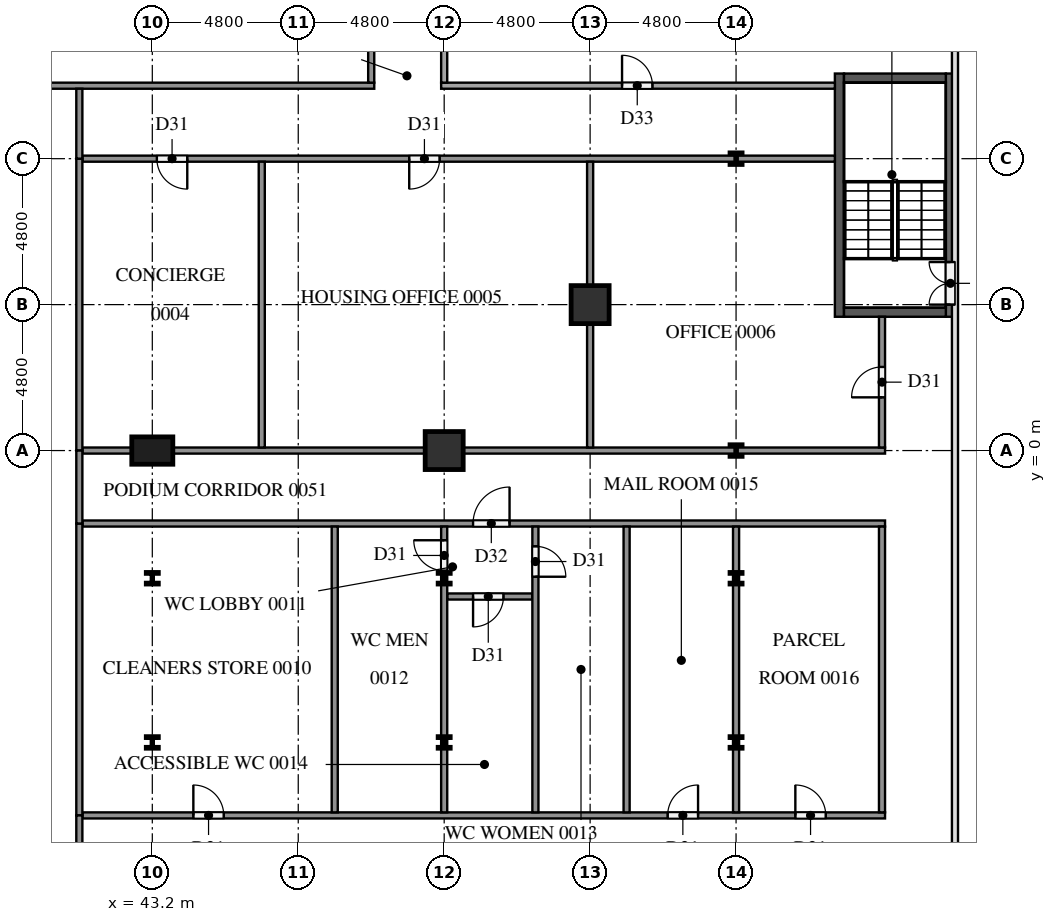
"""IFC4 building model, lengths in metres.
Left out: names, types, materials, properties, quantities, classifications, styles, units other than length and angle.
Written with IfcOpenShell. Run it as: python <this file> out.ifc"""

import sys

from ifc_helpers import new_model, si_unit, direction, frame, frame_2d, origin, origin_2d, place, context, subcontext, project, spatial, rectangle, i_section, extrude, element, fill, save


model = new_model("IFC4")
c1 = context("Model", 3, precision=1e-05, world=origin(), true_north=direction((0.0, 1.0)))
c2 = subcontext(c1, "Body", "Model", "MODEL_VIEW")
j1 = project(units=[si_unit("LENGTHUNIT", "METRE"), si_unit("PLANEANGLEUNIT", "RADIAN")], contexts=[c1])
p1 = place(None, origin())
s1 = spatial("IfcSite", under=j1, at=p1, CompositionType="ELEMENT")
p2 = place(p1, origin())
s2 = spatial("IfcBuilding", under=s1, at=p2, CompositionType="ELEMENT")
p3 = place(p2, origin())
s3 = spatial("IfcBuildingStorey", under=s2, at=p3, CompositionType="ELEMENT", Elevation=0.0)
p4 = place(p3, frame((65.8, 4.4, 0.0), z_axis=(0.0, 0.0, 1.0), x_axis=(0.0, 1.0, 0.0)))
e1 = element("IfcWall", 1, at=p4, inside=s3, PredefinedType="SOLIDWALL", context=c2, shape_type="SweptSolid", body=[
    extrude(rectangle(XDim=8.0, YDim=0.3, at=frame_2d((4.0, 0.0))), origin(), (0.0, 0.0, 1.0), 5.7),
])
p5 = place(p3, frame((69.45, 4.4, 0.0), z_axis=(0.0, 0.0, 1.0), x_axis=(0.0, 1.0, 0.0)))
e2 = element("IfcWall", 2, at=p5, inside=s3, PredefinedType="SOLIDWALL", context=c2, shape_type="SweptSolid", body=[
    extrude(rectangle(XDim=8.0, YDim=0.3, at=frame_2d((4.0, 0.0))), origin(), (0.0, 0.0, 1.0), 5.7),
])
p6 = place(p5, frame((0.4, 0.0, 0.0)))
e3 = element("IfcOpeningElement", 3, at=p6, cuts=e2, PredefinedType="OPENING", context=c2, shape_type="SweptSolid", body=[
    extrude(rectangle(XDim=1.4, YDim=2.1, at=frame_2d((0.7, 1.05))), frame((0.0, 0.16, 0.0), z_axis=(0.0, -1.0, 0.0), x_axis=(1.0, 0.0, 0.0)), (0.0, 0.0, 1.0), 0.32),
])
for number, where, z_axis, x_axis in (
    (4, (65.95, 4.55, 0.0), (0.0, 0.0, 1.0), (1.0, 0.0, 0.0)),
    (5, (65.95, 12.25, 0.0), (0.0, 0.0, 1.0), (1.0, 0.0, 0.0)),
):
    element("IfcWall", number, at=place(p3, frame(where, z_axis=z_axis, x_axis=x_axis)), inside=s3, PredefinedType="SOLIDWALL", context=c2, shape_type="SweptSolid", body=[
        extrude(rectangle(XDim=3.35, YDim=0.3, at=frame_2d((1.675, 0.0))), origin(), (0.0, 0.0, 1.0), 5.7),
    ])
p7 = place(p3, frame((43.2, 0.0, 0.0), z_axis=(0.0, 0.0, 1.0), x_axis=(1.0, 0.0, 0.0)))
e6 = element("IfcColumn", 6, at=p7, inside=s3, PredefinedType="COLUMN", context=c2, shape_type="SweptSolid", body=[
    extrude(rectangle(XDim=1.35, YDim=0.9, at=origin_2d()), origin(), (0.0, 0.0, 1.0), 5.7),
])
for number, where, z_axis, x_axis in (
    (7, (52.8, 0.0, 0.0), (0.0, 0.0, 1.0), (1.0, 0.0, 0.0)),
    (8, (57.6, 4.8, 0.0), (0.0, 0.0, 1.0), (1.0, 0.0, 0.0)),
):
    element("IfcColumn", number, at=place(p3, frame(where, z_axis=z_axis, x_axis=x_axis)), inside=s3, PredefinedType="COLUMN", context=c2, shape_type="SweptSolid", body=[
        extrude(rectangle(XDim=1.25, YDim=1.25, at=origin_2d()), origin(), (0.0, 0.0, 1.0), 5.7),
    ])
for number, where, z_axis, x_axis in (
    (9, (43.2, -9.6, 0.0), (0.0, 0.0, 1.0), (1.0, 0.0, 0.0)),
    (10, (43.2, -4.2, 0.0), (0.0, 0.0, 1.0), (1.0, 0.0, 0.0)),
    (11, (52.8, -9.6, 0.0), (0.0, 0.0, 1.0), (1.0, 0.0, 0.0)),
    (12, (52.8, -4.2, 0.0), (0.0, 0.0, 1.0), (1.0, 0.0, 0.0)),
    (13, (62.4, -9.6, 0.0), (0.0, 0.0, 1.0), (1.0, 0.0, 0.0)),
    (14, (62.4, -4.2, 0.0), (0.0, 0.0, 1.0), (1.0, 0.0, 0.0)),
    (15, (62.4, 0.0, 0.0), (0.0, 0.0, 1.0), (1.0, 0.0, 0.0)),
    (16, (62.4, 9.6, 0.0), (0.0, 0.0, 1.0), (1.0, 0.0, 0.0)),
):
    element("IfcColumn", number, at=place(p3, frame(where, z_axis=z_axis, x_axis=x_axis)), inside=s3, PredefinedType="COLUMN", context=c2, shape_type="SweptSolid", body=[
        extrude(i_section(OverallWidth=0.396, OverallDepth=0.381, WebThickness=0.019, FlangeThickness=0.03, at=origin_2d()), origin(), (0.0, 0.0, 1.0), 5.7),
    ])
p8 = place(p3, frame((40.9, -12.0, 0.0), z_axis=(0.0, 0.0, 1.0), x_axis=(1.0, 0.0, 0.0)))
e17 = element("IfcWall", 17, at=p8, inside=s3, PredefinedType="PARTITIONING", context=c2, shape_type="SweptSolid", body=[
    extrude(rectangle(XDim=26.4, YDim=0.2, at=frame_2d((13.2, 0.0))), origin(), (0.0, 0.0, 1.0), 5.7),
])
p9 = place(p8, frame((3.65, 0.0, 0.0)))
e18 = element("IfcOpeningElement", 18, at=p9, cuts=e17, PredefinedType="OPENING", context=c2, shape_type="SweptSolid", body=[
    extrude(rectangle(XDim=1.0, YDim=2.1, at=frame_2d((0.5, 1.05))), frame((0.0, 0.11, 0.0), z_axis=(0.0, -1.0, 0.0), x_axis=(1.0, 0.0, 0.0)), (0.0, 0.0, 1.0), 0.22),
])
p10 = place(p8, frame((19.25, 0.0, 0.0)))
e19 = element("IfcOpeningElement", 19, at=p10, cuts=e17, PredefinedType="OPENING", context=c2, shape_type="SweptSolid", body=[
    extrude(rectangle(XDim=1.0, YDim=2.1, at=frame_2d((0.5, 1.05))), frame((0.0, 0.11, 0.0), z_axis=(0.0, -1.0, 0.0), x_axis=(1.0, 0.0, 0.0)), (0.0, 0.0, 1.0), 0.22),
])
p11 = place(p8, frame((23.45, 0.0, 0.0)))
e20 = element("IfcOpeningElement", 20, at=p11, cuts=e17, PredefinedType="OPENING", context=c2, shape_type="SweptSolid", body=[
    extrude(rectangle(XDim=1.0, YDim=2.1, at=frame_2d((0.5, 1.05))), frame((0.0, 0.11, 0.0), z_axis=(0.0, -1.0, 0.0), x_axis=(1.0, 0.0, 0.0)), (0.0, 0.0, 1.0), 0.22),
])
p12 = place(p3, frame((55.7, -4.8, 0.0), z_axis=(0.0, 0.0, 1.0), x_axis=(-1.0, 0.0, 0.0)))
e21 = element("IfcWall", 21, at=p12, inside=s3, PredefinedType="PARTITIONING", context=c2, shape_type="SweptSolid", body=[
    extrude(rectangle(XDim=2.8, YDim=0.2, at=frame_2d((1.4, 0.0))), origin(), (0.0, 0.0, 1.0), 5.7),
])
p13 = place(p12, frame((0.95, 0.0, 0.0)))
e22 = element("IfcOpeningElement", 22, at=p13, cuts=e21, PredefinedType="OPENING", context=c2, shape_type="SweptSolid", body=[
    extrude(rectangle(XDim=1.0, YDim=2.1, at=frame_2d((0.5, 1.05))), frame((0.0, 0.11, 0.0), z_axis=(0.0, -1.0, 0.0), x_axis=(1.0, 0.0, 0.0)), (0.0, 0.0, 1.0), 0.22),
])
p14 = place(p3, frame((40.9, -2.4, 0.0), z_axis=(0.0, 0.0, 1.0), x_axis=(1.0, 0.0, 0.0)))
e23 = element("IfcWall", 23, at=p14, inside=s3, PredefinedType="PARTITIONING", context=c2, shape_type="SweptSolid", body=[
    extrude(rectangle(XDim=26.4, YDim=0.2, at=frame_2d((13.2, 0.0))), origin(), (0.0, 0.0, 1.0), 5.7),
])
p15 = place(p14, frame((12.85, 0.0, 0.0)))
e24 = element("IfcOpeningElement", 24, at=p15, cuts=e23, PredefinedType="OPENING", context=c2, shape_type="SweptSolid", body=[
    extrude(rectangle(XDim=1.2, YDim=2.1, at=frame_2d((0.6, 1.05))), frame((0.0, 0.11, 0.0), z_axis=(0.0, -1.0, 0.0), x_axis=(1.0, 0.0, 0.0)), (0.0, 0.0, 1.0), 0.22),
])
p16 = place(p3, frame((40.9, 0.0, 0.0), z_axis=(0.0, 0.0, 1.0), x_axis=(1.0, 0.0, 0.0)))
e25 = element("IfcWall", 25, at=p16, inside=s3, PredefinedType="PARTITIONING", context=c2, shape_type="SweptSolid", body=[
    extrude(rectangle(XDim=26.4, YDim=0.2, at=frame_2d((13.2, 0.0))), origin(), (0.0, 0.0, 1.0), 5.7),
])
p17 = place(p3, frame((65.65, 9.6, 0.0), z_axis=(0.0, 0.0, 1.0), x_axis=(-1.0, 0.0, 0.0)))
e26 = element("IfcWall", 26, at=p17, inside=s3, PredefinedType="PARTITIONING", context=c2, shape_type="SweptSolid", body=[
    extrude(rectangle(XDim=24.75, YDim=0.2, at=frame_2d((12.375, 0.0))), origin(), (0.0, 0.0, 1.0), 5.7),
])
p18 = place(p17, frame((21.3, 0.0, 0.0)))
e27 = element("IfcOpeningElement", 27, at=p18, cuts=e26, PredefinedType="OPENING", context=c2, shape_type="SweptSolid", body=[
    extrude(rectangle(XDim=1.0, YDim=2.1, at=frame_2d((0.5, 1.05))), frame((0.0, 0.11, 0.0), z_axis=(0.0, -1.0, 0.0), x_axis=(1.0, 0.0, 0.0)), (0.0, 0.0, 1.0), 0.22),
])
p19 = place(p17, frame((13.0, 0.0, 0.0)))
e28 = element("IfcOpeningElement", 28, at=p19, cuts=e26, PredefinedType="OPENING", context=c2, shape_type="SweptSolid", body=[
    extrude(rectangle(XDim=1.0, YDim=2.1, at=frame_2d((0.5, 1.05))), frame((0.0, 0.11, 0.0), z_axis=(0.0, -1.0, 0.0), x_axis=(1.0, 0.0, 0.0)), (0.0, 0.0, 1.0), 0.22),
])
p20 = place(p3, frame((11.9, 12.0, 0.0), z_axis=(0.0, 0.0, 1.0), x_axis=(1.0, 0.0, 0.0)))
e29 = element("IfcWall", 29, at=p20, inside=s3, PredefinedType="PARTITIONING", context=c2, shape_type="SweptSolid", body=[
    extrude(rectangle(XDim=38.6, YDim=0.2, at=frame_2d((19.3, 0.0))), origin(), (0.0, 0.0, 1.0), 5.7),
])
p21 = place(p20, frame((1.85, 0.0, 0.0)))
e30 = element("IfcOpeningElement", 30, at=p21, cuts=e29, PredefinedType="OPENING", context=c2, shape_type="SweptSolid", body=[
    extrude(rectangle(XDim=1.8, YDim=2.1, at=frame_2d((0.9, 1.05))), frame((0.0, 0.11, 0.0), z_axis=(0.0, -1.0, 0.0), x_axis=(1.0, 0.0, 0.0)), (0.0, 0.0, 1.0), 0.22),
])
p22 = place(p20, frame((23.25, 0.0, 0.0)))
e31 = element("IfcOpeningElement", 31, at=p22, cuts=e29, PredefinedType="OPENING", context=c2, shape_type="SweptSolid", body=[
    extrude(rectangle(XDim=1.8, YDim=2.1, at=frame_2d((0.9, 1.05))), frame((0.0, 0.11, 0.0), z_axis=(0.0, -1.0, 0.0), x_axis=(1.0, 0.0, 0.0)), (0.0, 0.0, 1.0), 0.22),
])
p23 = place(p20, frame((13.65, 0.0, 0.0)))
e32 = element("IfcOpeningElement", 32, at=p23, cuts=e29, PredefinedType="OPENING", context=c2, shape_type="SweptSolid", body=[
    extrude(rectangle(XDim=1.8, YDim=2.1, at=frame_2d((0.9, 1.05))), frame((0.0, 0.11, 0.0), z_axis=(0.0, -1.0, 0.0), x_axis=(1.0, 0.0, 0.0)), (0.0, 0.0, 1.0), 0.22),
])
p24 = place(p20, frame((4.05, 0.0, 0.0)))
e33 = element("IfcOpeningElement", 33, at=p24, cuts=e29, PredefinedType="OPENING", context=c2, shape_type="SweptSolid", body=[
    extrude(rectangle(XDim=1.8, YDim=2.1, at=frame_2d((0.9, 1.05))), frame((0.0, 0.11, 0.0), z_axis=(0.0, -1.0, 0.0), x_axis=(1.0, 0.0, 0.0)), (0.0, 0.0, 1.0), 0.22),
])
p25 = place(p3, frame((52.7, 12.0, 0.0), z_axis=(0.0, 0.0, 1.0), x_axis=(1.0, 0.0, 0.0)))
e34 = element("IfcWall", 34, at=p25, inside=s3, PredefinedType="PARTITIONING", context=c2, shape_type="SweptSolid", body=[
    extrude(rectangle(XDim=12.95, YDim=0.2, at=frame_2d((6.475, 0.0))), origin(), (0.0, 0.0, 1.0), 5.7),
])
p26 = place(p25, frame((5.95, 0.0, 0.0)))
e35 = element("IfcOpeningElement", 35, at=p26, cuts=e34, PredefinedType="OPENING", context=c2, shape_type="SweptSolid", body=[
    extrude(rectangle(XDim=1.0, YDim=2.1, at=frame_2d((0.5, 1.05))), frame((0.0, 0.11, 0.0), z_axis=(0.0, -1.0, 0.0), x_axis=(1.0, 0.0, 0.0)), (0.0, 0.0, 1.0), 0.22),
])
for number, where, z_axis, x_axis in (
    (36, (40.8, -12.0, 0.0), (0.0, 0.0, 1.0), (0.0, 1.0, 0.0)),
    (37, (40.8, 0.0, 0.0), (0.0, 0.0, 1.0), (0.0, 1.0, 0.0)),
):
    element("IfcWall", number, at=place(p3, frame(where, z_axis=z_axis, x_axis=x_axis)), inside=s3, PredefinedType="PARTITIONING", context=c2, shape_type="SweptSolid", body=[
        extrude(rectangle(XDim=9.6, YDim=0.2, at=frame_2d((4.8, 0.0))), origin(), (0.0, 0.0, 1.0), 5.7),
    ])
for number, where, z_axis, x_axis in (
    (38, (40.8, -14.4, 0.0), (0.0, 0.0, 1.0), (0.0, 1.0, 0.0)),
    (39, (40.8, -2.4, 0.0), (0.0, 0.0, 1.0), (0.0, 1.0, 0.0)),
):
    element("IfcWall", number, at=place(p3, frame(where, z_axis=z_axis, x_axis=x_axis)), inside=s3, PredefinedType="PARTITIONING", context=c2, shape_type="SweptSolid", body=[
        extrude(rectangle(XDim=2.4, YDim=0.2, at=frame_2d((1.2, 0.0))), origin(), (0.0, 0.0, 1.0), 5.7),
    ])
p27 = place(p3, frame((40.8, 9.6, 0.0), z_axis=(0.0, 0.0, 1.0), x_axis=(0.0, 1.0, 0.0)))
e40 = element("IfcWall", 40, at=p27, inside=s3, PredefinedType="PARTITIONING", context=c2, shape_type="SweptSolid", body=[
    extrude(rectangle(XDim=2.3, YDim=0.2, at=frame_2d((1.15, 0.0))), origin(), (0.0, 0.0, 1.0), 5.7),
])
for number, where, z_axis, x_axis in (
    (41, (46.8, 0.1, 0.0), (0.0, 0.0, 1.0), (0.0, 1.0, 0.0)),
    (42, (49.2, -11.9, 0.0), (0.0, 0.0, 1.0), (0.0, 1.0, 0.0)),
):
    element("IfcWall", number, at=place(p3, frame(where, z_axis=z_axis, x_axis=x_axis)), inside=s3, PredefinedType="PARTITIONING", context=c2, shape_type="SweptSolid", body=[
        extrude(rectangle(XDim=9.4, YDim=0.2, at=frame_2d((4.7, 0.0))), origin(), (0.0, 0.0, 1.0), 5.7),
    ])
p28 = place(p3, frame((50.4, 12.1, 0.0), z_axis=(0.0, 0.0, 1.0), x_axis=(0.0, 1.0, 0.0)))
e43 = element("IfcWall", 43, at=p28, inside=s3, PredefinedType="PARTITIONING", context=c2, shape_type="SweptSolid", body=[
    extrude(rectangle(XDim=13.0, YDim=0.2, at=frame_2d((6.5, 0.0))), origin(), (0.0, 0.0, 1.0), 5.7),
])
p29 = place(p28, frame((2.75, 0.0, 0.0)))
e44 = element("IfcOpeningElement", 44, at=p29, cuts=e43, PredefinedType="OPENING", context=c2, shape_type="SweptSolid", body=[
    extrude(rectangle(XDim=1.8, YDim=2.1, at=frame_2d((0.9, 1.05))), frame((0.0, 0.11, 0.0), z_axis=(0.0, -1.0, 0.0), x_axis=(1.0, 0.0, 0.0)), (0.0, 0.0, 1.0), 0.22),
])
p30 = place(p3, frame((52.8, -11.9, 0.0), z_axis=(0.0, 0.0, 1.0), x_axis=(0.0, 1.0, 0.0)))
e45 = element("IfcWall", 45, at=p30, inside=s3, PredefinedType="PARTITIONING", context=c2, shape_type="SweptSolid", body=[
    extrude(rectangle(XDim=9.4, YDim=0.2, at=frame_2d((4.7, 0.0))), origin(), (0.0, 0.0, 1.0), 5.7),
])
p31 = place(p30, frame((7.95, 0.0, 0.0)))
e46 = element("IfcOpeningElement", 46, at=p31, cuts=e45, PredefinedType="OPENING", context=c2, shape_type="SweptSolid", body=[
    extrude(rectangle(XDim=1.0, YDim=2.1, at=frame_2d((0.5, 1.05))), frame((0.0, 0.11, 0.0), z_axis=(0.0, -1.0, 0.0), x_axis=(1.0, 0.0, 0.0)), (0.0, 0.0, 1.0), 0.22),
])
p32 = place(p3, frame((52.8, 12.1, 0.0), z_axis=(0.0, 0.0, 1.0), x_axis=(0.0, 1.0, 0.0)))
e47 = element("IfcWall", 47, at=p32, inside=s3, PredefinedType="PARTITIONING", context=c2, shape_type="SweptSolid", body=[
    extrude(rectangle(XDim=13.0, YDim=0.2, at=frame_2d((6.5, 0.0))), origin(), (0.0, 0.0, 1.0), 5.7),
])
p33 = place(p3, frame((55.8, -2.5, 0.0), z_axis=(0.0, 0.0, 1.0), x_axis=(0.0, -1.0, 0.0)))
e48 = element("IfcWall", 48, at=p33, inside=s3, PredefinedType="PARTITIONING", context=c2, shape_type="SweptSolid", body=[
    extrude(rectangle(XDim=9.4, YDim=0.2, at=frame_2d((4.7, 0.0))), origin(), (0.0, 0.0, 1.0), 5.7),
])
p34 = place(p33, frame((0.65, 0.0, 0.0)))
e49 = element("IfcOpeningElement", 49, at=p34, cuts=e48, PredefinedType="OPENING", context=c2, shape_type="SweptSolid", body=[
    extrude(rectangle(XDim=1.0, YDim=2.1, at=frame_2d((0.5, 1.05))), frame((0.0, 0.11, 0.0), z_axis=(0.0, -1.0, 0.0), x_axis=(1.0, 0.0, 0.0)), (0.0, 0.0, 1.0), 0.22),
])
for number, where, z_axis, x_axis in (
    (50, (57.6, 0.1, 0.0), (0.0, 0.0, 1.0), (0.0, 1.0, 0.0)),
    (51, (58.8, -11.9, 0.0), (0.0, 0.0, 1.0), (0.0, 1.0, 0.0)),
    (52, (62.4, -11.9, 0.0), (0.0, 0.0, 1.0), (0.0, 1.0, 0.0)),
    (53, (67.2, -11.9, 0.0), (0.0, 0.0, 1.0), (0.0, 1.0, 0.0)),
):
    element("IfcWall", number, at=place(p3, frame(where, z_axis=z_axis, x_axis=x_axis)), inside=s3, PredefinedType="PARTITIONING", context=c2, shape_type="SweptSolid", body=[
        extrude(rectangle(XDim=9.4, YDim=0.2, at=frame_2d((4.7, 0.0))), origin(), (0.0, 0.0, 1.0), 5.7),
    ])
p35 = place(p3, frame((67.2, 0.1, 0.0), z_axis=(0.0, 0.0, 1.0), x_axis=(0.0, 1.0, 0.0)))
e54 = element("IfcWall", 54, at=p35, inside=s3, PredefinedType="PARTITIONING", context=c2, shape_type="SweptSolid", body=[
    extrude(rectangle(XDim=4.3, YDim=0.2, at=frame_2d((2.15, 0.0))), origin(), (0.0, 0.0, 1.0), 5.7),
])
p36 = place(p35, frame((1.65, 0.0, 0.0)))
e55 = element("IfcOpeningElement", 55, at=p36, cuts=e54, PredefinedType="OPENING", context=c2, shape_type="SweptSolid", body=[
    extrude(rectangle(XDim=1.0, YDim=2.1, at=frame_2d((0.5, 1.05))), frame((0.0, 0.11, 0.0), z_axis=(0.0, -1.0, 0.0), x_axis=(1.0, 0.0, 0.0)), (0.0, 0.0, 1.0), 0.22),
])
p37 = place(p6, frame((1.4, 0.0, 0.0), z_axis=(0.0, 0.0, 1.0), x_axis=(-1.0, 0.0, 0.0)))
e56 = element("IfcDoor", 56, at=p37, inside=s3, OperationType="DOUBLE_DOOR_SINGLE_SWING", PredefinedType="DOOR", context=c2, shape_type="SweptSolid", body=[
    extrude(rectangle(XDim=1.4, YDim=2.1, at=frame_2d((0.7, 1.05))), frame((0.0, 0.025, 0.0), z_axis=(0.0, -1.0, 0.0), x_axis=(1.0, 0.0, 0.0)), (0.0, 0.0, 1.0), 0.05),
])
fill(e3, e56)
p38 = place(p18, origin())
e57 = element("IfcDoor", 57, at=p38, inside=s3, OperationType="SINGLE_SWING_LEFT", PredefinedType="DOOR", context=c2, shape_type="SweptSolid", body=[
    extrude(rectangle(XDim=1.0, YDim=2.1, at=frame_2d((0.5, 1.05))), frame((0.0, 0.025, 0.0), z_axis=(0.0, -1.0, 0.0), x_axis=(1.0, 0.0, 0.0)), (0.0, 0.0, 1.0), 0.05),
])
fill(e27, e57)
p39 = place(p19, origin())
e58 = element("IfcDoor", 58, at=p39, inside=s3, OperationType="SINGLE_SWING_RIGHT", PredefinedType="DOOR", context=c2, shape_type="SweptSolid", body=[
    extrude(rectangle(XDim=1.0, YDim=2.1, at=frame_2d((0.5, 1.05))), frame((0.0, 0.025, 0.0), z_axis=(0.0, -1.0, 0.0), x_axis=(1.0, 0.0, 0.0)), (0.0, 0.0, 1.0), 0.05),
])
fill(e28, e58)
p40 = place(p36, origin())
e59 = element("IfcDoor", 59, at=p40, inside=s3, OperationType="SINGLE_SWING_LEFT", PredefinedType="DOOR", context=c2, shape_type="SweptSolid", body=[
    extrude(rectangle(XDim=1.0, YDim=2.1, at=frame_2d((0.5, 1.05))), frame((0.0, 0.025, 0.0), z_axis=(0.0, -1.0, 0.0), x_axis=(1.0, 0.0, 0.0)), (0.0, 0.0, 1.0), 0.05),
])
fill(e55, e59)
p41 = place(p9, origin())
e60 = element("IfcDoor", 60, at=p41, inside=s3, OperationType="SINGLE_SWING_LEFT", PredefinedType="DOOR", context=c2, shape_type="SweptSolid", body=[
    extrude(rectangle(XDim=1.0, YDim=2.1, at=frame_2d((0.5, 1.05))), frame((0.0, 0.025, 0.0), z_axis=(0.0, -1.0, 0.0), x_axis=(1.0, 0.0, 0.0)), (0.0, 0.0, 1.0), 0.05),
])
fill(e18, e60)
p42 = place(p15, origin())
e61 = element("IfcDoor", 61, at=p42, inside=s3, OperationType="SINGLE_SWING_RIGHT", PredefinedType="DOOR", context=c2, shape_type="SweptSolid", body=[
    extrude(rectangle(XDim=1.2, YDim=2.1, at=frame_2d((0.6, 1.05))), frame((0.0, 0.025, 0.0), z_axis=(0.0, -1.0, 0.0), x_axis=(1.0, 0.0, 0.0)), (0.0, 0.0, 1.0), 0.05),
])
fill(e24, e61)
p43 = place(p31, origin())
e62 = element("IfcDoor", 62, at=p43, inside=s3, OperationType="SINGLE_SWING_RIGHT", PredefinedType="DOOR", context=c2, shape_type="SweptSolid", body=[
    extrude(rectangle(XDim=1.0, YDim=2.1, at=frame_2d((0.5, 1.05))), frame((0.0, 0.025, 0.0), z_axis=(0.0, -1.0, 0.0), x_axis=(1.0, 0.0, 0.0)), (0.0, 0.0, 1.0), 0.05),
])
fill(e46, e62)
p44 = place(p34, origin())
e63 = element("IfcDoor", 63, at=p44, inside=s3, OperationType="SINGLE_SWING_RIGHT", PredefinedType="DOOR", context=c2, shape_type="SweptSolid", body=[
    extrude(rectangle(XDim=1.0, YDim=2.1, at=frame_2d((0.5, 1.05))), frame((0.0, 0.025, 0.0), z_axis=(0.0, -1.0, 0.0), x_axis=(1.0, 0.0, 0.0)), (0.0, 0.0, 1.0), 0.05),
])
fill(e49, e63)
p45 = place(p13, origin())
e64 = element("IfcDoor", 64, at=p45, inside=s3, OperationType="SINGLE_SWING_RIGHT", PredefinedType="DOOR", context=c2, shape_type="SweptSolid", body=[
    extrude(rectangle(XDim=1.0, YDim=2.1, at=frame_2d((0.5, 1.05))), frame((0.0, 0.025, 0.0), z_axis=(0.0, -1.0, 0.0), x_axis=(1.0, 0.0, 0.0)), (0.0, 0.0, 1.0), 0.05),
])
fill(e22, e64)
p46 = place(p10, origin())
e65 = element("IfcDoor", 65, at=p46, inside=s3, OperationType="SINGLE_SWING_RIGHT", PredefinedType="DOOR", context=c2, shape_type="SweptSolid", body=[
    extrude(rectangle(XDim=1.0, YDim=2.1, at=frame_2d((0.5, 1.05))), frame((0.0, 0.025, 0.0), z_axis=(0.0, -1.0, 0.0), x_axis=(1.0, 0.0, 0.0)), (0.0, 0.0, 1.0), 0.05),
])
fill(e19, e65)
p47 = place(p11, origin())
e66 = element("IfcDoor", 66, at=p47, inside=s3, OperationType="SINGLE_SWING_LEFT", PredefinedType="DOOR", context=c2, shape_type="SweptSolid", body=[
    extrude(rectangle(XDim=1.0, YDim=2.1, at=frame_2d((0.5, 1.05))), frame((0.0, 0.025, 0.0), z_axis=(0.0, -1.0, 0.0), x_axis=(1.0, 0.0, 0.0)), (0.0, 0.0, 1.0), 0.05),
])
fill(e20, e66)
p48 = place(p26, origin())
e67 = element("IfcDoor", 67, at=p48, inside=s3, OperationType="SINGLE_SWING_LEFT", PredefinedType="DOOR", context=c2, shape_type="SweptSolid", body=[
    extrude(rectangle(XDim=1.0, YDim=2.1, at=frame_2d((0.5, 1.05))), frame((0.0, 0.025, 0.0), z_axis=(0.0, -1.0, 0.0), x_axis=(1.0, 0.0, 0.0)), (0.0, 0.0, 1.0), 0.05),
])
fill(e35, e67)
save(model, sys.argv[1])
